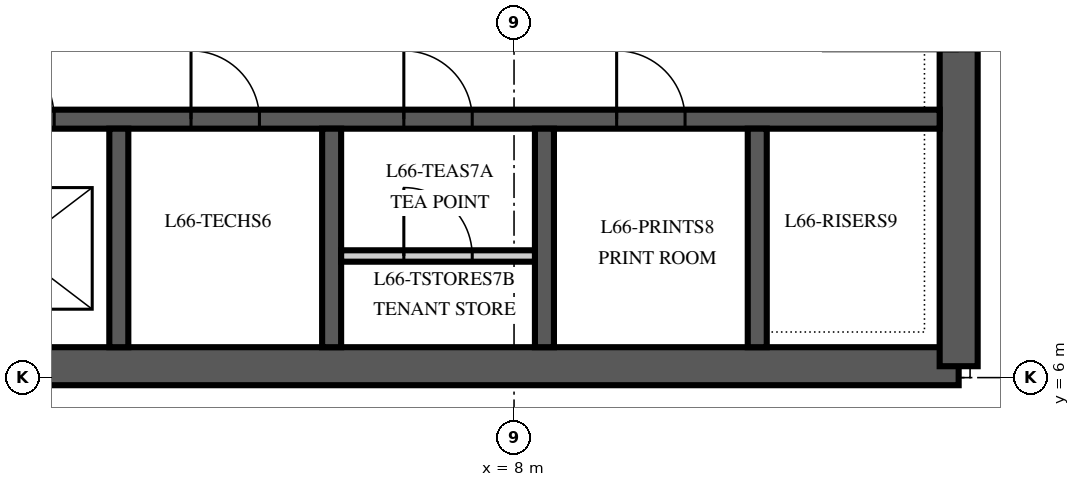
"""IFC4 building model, lengths in metres.
Left out: names, types, materials, properties, quantities, classifications, styles, units other than length and angle.
Written with IfcOpenShell. Run it as: python <this file> out.ifc"""

import sys

from ifc_helpers import new_model, si_unit, direction, frame, frame_2d, origin, place, context, subcontext, project, spatial, polyline, rectangle, outline, extrude, element, fill, save


model = new_model("IFC4")
c1 = context("Model", 3, precision=1e-05, world=origin(), true_north=direction((0.0, 1.0)))
c2 = subcontext(c1, "Body", "Model", "MODEL_VIEW")
j1 = project(units=[si_unit("LENGTHUNIT", "METRE"), si_unit("PLANEANGLEUNIT", "RADIAN")], contexts=[c1])
p1 = place(None, origin())
s1 = spatial("IfcSite", under=j1, at=p1, CompositionType="ELEMENT")
p2 = place(p1, origin())
s2 = spatial("IfcBuilding", under=s1, at=p2, CompositionType="ELEMENT")
p3 = place(p2, frame((0.0, 0.0, 284.0)))
s3 = spatial("IfcBuildingStorey", under=s2, at=p3, CompositionType="ELEMENT", Elevation=284.0)
p4 = place(p3, frame((-13.85, 6.15, 0.0), z_axis=(0.0, 0.0, 1.0), x_axis=(1.0, 0.0, 0.0)))
e1 = element("IfcWall", 1, at=p4, inside=s3, PredefinedType="SHEAR", context=c2, shape_type="SweptSolid", body=[
    extrude(rectangle(XDim=27.7, YDim=0.5, at=frame_2d((13.85, 0.0))), origin(), (0.0, 0.0, 1.0), 4.0),
])
p5 = place(p3, frame((13.85, 6.15, 0.0), z_axis=(0.0, 0.0, 1.0), x_axis=(0.0, 1.0, 0.0)))
e2 = element("IfcWall", 2, at=p5, inside=s3, PredefinedType="SHEAR", context=c2, shape_type="SweptSolid", body=[
    extrude(outline(polyline([(0.0, -0.25), (17.7, -0.25), (17.7, 0.0), (17.45, 0.0), (17.45, 0.25), (0.25, 0.25), (0.25, 0.0), (0.0, 0.0), (0.0, -0.25)])), origin(), (0.0, 0.0, 1.0), 4.0),
])
p6 = place(p5, frame((4.15, 0.0, 0.0)))
e3 = element("IfcOpeningElement", 3, at=p6, cuts=e2, PredefinedType="OPENING", context=c2, shape_type="SweptSolid", body=[
    extrude(rectangle(XDim=1.8, YDim=2.4, at=frame_2d((0.9, 1.2))), frame((0.0, 0.265, 0.0), z_axis=(0.0, -1.0, 0.0), x_axis=(1.0, 0.0, 0.0)), (0.0, 0.0, 1.0), 0.53),
])
p7 = place(p3, frame((-13.6, 9.4, 0.0), z_axis=(0.0, 0.0, 1.0), x_axis=(1.0, 0.0, 0.0)))
e4 = element("IfcWall", 4, at=p7, inside=s3, PredefinedType="SHEAR", context=c2, shape_type="SweptSolid", body=[
    extrude(rectangle(XDim=27.2, YDim=0.25, at=frame_2d((13.6, 0.0))), origin(), (0.0, 0.0, 1.0), 4.0),
])
p8 = place(p7, frame((8.85, 0.0, 0.0)))
e5 = element("IfcOpeningElement", 5, at=p8, cuts=e4, PredefinedType="OPENING", context=c2, shape_type="SweptSolid", body=[
    extrude(rectangle(XDim=1.1, YDim=2.1, at=frame_2d((0.55, 1.05))), frame((0.0, 0.14, 0.0), z_axis=(0.0, -1.0, 0.0), x_axis=(1.0, 0.0, 0.0)), (0.0, 0.0, 1.0), 0.28),
])
p9 = place(p7, frame((11.65, 0.0, 0.0)))
e6 = element("IfcOpeningElement", 6, at=p9, cuts=e4, PredefinedType="OPENING", context=c2, shape_type="SweptSolid", body=[
    extrude(rectangle(XDim=1.1, YDim=2.1, at=frame_2d((0.55, 1.05))), frame((0.0, 0.14, 0.0), z_axis=(0.0, -1.0, 0.0), x_axis=(1.0, 0.0, 0.0)), (0.0, 0.0, 1.0), 0.28),
])
p10 = place(p7, frame((14.45, 0.0, 0.0)))
e7 = element("IfcOpeningElement", 7, at=p10, cuts=e4, PredefinedType="OPENING", context=c2, shape_type="SweptSolid", body=[
    extrude(rectangle(XDim=1.1, YDim=2.1, at=frame_2d((0.55, 1.05))), frame((0.0, 0.14, 0.0), z_axis=(0.0, -1.0, 0.0), x_axis=(1.0, 0.0, 0.0)), (0.0, 0.0, 1.0), 0.28),
])
p11 = place(p7, frame((0.55, 0.0, 0.0)))
e8 = element("IfcOpeningElement", 8, at=p11, cuts=e4, PredefinedType="OPENING", context=c2, shape_type="SweptSolid", body=[
    extrude(rectangle(XDim=0.9, YDim=2.1, at=frame_2d((0.45, 1.05))), frame((0.0, 0.14, 0.0), z_axis=(0.0, -1.0, 0.0), x_axis=(1.0, 0.0, 0.0)), (0.0, 0.0, 1.0), 0.28),
])
p12 = place(p7, frame((3.35, 0.0, 0.0)))
e9 = element("IfcOpeningElement", 9, at=p12, cuts=e4, PredefinedType="OPENING", context=c2, shape_type="SweptSolid", body=[
    extrude(rectangle(XDim=0.9, YDim=2.1, at=frame_2d((0.45, 1.05))), frame((0.0, 0.14, 0.0), z_axis=(0.0, -1.0, 0.0), x_axis=(1.0, 0.0, 0.0)), (0.0, 0.0, 1.0), 0.28),
])
p13 = place(p7, frame((6.15, 0.0, 0.0)))
e10 = element("IfcOpeningElement", 10, at=p13, cuts=e4, PredefinedType="OPENING", context=c2, shape_type="SweptSolid", body=[
    extrude(rectangle(XDim=0.9, YDim=2.1, at=frame_2d((0.45, 1.05))), frame((0.0, 0.14, 0.0), z_axis=(0.0, -1.0, 0.0), x_axis=(1.0, 0.0, 0.0)), (0.0, 0.0, 1.0), 0.28),
])
p14 = place(p7, frame((17.35, 0.0, 0.0)))
e11 = element("IfcOpeningElement", 11, at=p14, cuts=e4, PredefinedType="OPENING", context=c2, shape_type="SweptSolid", body=[
    extrude(rectangle(XDim=0.9, YDim=2.1, at=frame_2d((0.45, 1.05))), frame((0.0, 0.14, 0.0), z_axis=(0.0, -1.0, 0.0), x_axis=(1.0, 0.0, 0.0)), (0.0, 0.0, 1.0), 0.28),
])
p15 = place(p7, frame((20.15, 0.0, 0.0)))
e12 = element("IfcOpeningElement", 12, at=p15, cuts=e4, PredefinedType="OPENING", context=c2, shape_type="SweptSolid", body=[
    extrude(rectangle(XDim=0.9, YDim=2.1, at=frame_2d((0.45, 1.05))), frame((0.0, 0.14, 0.0), z_axis=(0.0, -1.0, 0.0), x_axis=(1.0, 0.0, 0.0)), (0.0, 0.0, 1.0), 0.28),
])
p16 = place(p7, frame((22.95, 0.0, 0.0)))
e13 = element("IfcOpeningElement", 13, at=p16, cuts=e4, PredefinedType="OPENING", context=c2, shape_type="SweptSolid", body=[
    extrude(rectangle(XDim=0.9, YDim=2.1, at=frame_2d((0.45, 1.05))), frame((0.0, 0.14, 0.0), z_axis=(0.0, -1.0, 0.0), x_axis=(1.0, 0.0, 0.0)), (0.0, 0.0, 1.0), 0.28),
])
for number, where, z_axis, x_axis in (
    (14, (2.8, 6.4, 0.0), (0.0, 0.0, 1.0), (0.0, 1.0, 0.0)),
    (15, (5.6, 6.4, 0.0), (0.0, 0.0, 1.0), (0.0, 1.0, 0.0)),
    (16, (8.4, 6.4, 0.0), (0.0, 0.0, 1.0), (0.0, 1.0, 0.0)),
    (17, (11.2, 6.4, 0.0), (0.0, 0.0, 1.0), (0.0, 1.0, 0.0)),
):
    element("IfcWall", number, at=place(p3, frame(where, z_axis=z_axis, x_axis=x_axis)), inside=s3, PredefinedType="SHEAR", context=c2, shape_type="SweptSolid", body=[
        extrude(rectangle(XDim=2.875, YDim=0.25, at=frame_2d((1.438, 0.0))), origin(), (0.0, 0.0, 1.0), 4.0),
    ])
p17 = place(p3, frame((5.725, 7.6, 0.0), z_axis=(0.0, 0.0, 1.0), x_axis=(1.0, 0.0, 0.0)))
e18 = element("IfcWall", 18, at=p17, inside=s3, PredefinedType="PARTITIONING", context=c2, shape_type="SweptSolid", body=[
    extrude(rectangle(XDim=2.55, YDim=0.15, at=frame_2d((1.275, 0.0))), origin(), (0.0, 0.0, 1.0), 3.85),
])
p18 = place(p17, frame((0.825, 0.0, 0.0)))
e19 = element("IfcOpeningElement", 19, at=p18, cuts=e18, PredefinedType="OPENING", context=c2, shape_type="SweptSolid", body=[
    extrude(rectangle(XDim=0.9, YDim=2.1, at=frame_2d((0.45, 1.05))), frame((0.0, 0.09, 0.0), z_axis=(0.0, -1.0, 0.0), x_axis=(1.0, 0.0, 0.0)), (0.0, 0.0, 1.0), 0.18),
])
p19 = place(p10, origin())
e20 = element("IfcDoor", 20, at=p19, inside=s3, OperationType="SLIDING_TO_LEFT", PredefinedType="DOOR", context=c2, shape_type="SweptSolid", body=[
    extrude(rectangle(XDim=1.1, YDim=2.1, at=frame_2d((0.55, 1.05))), frame((0.0, 0.125, 0.0), z_axis=(0.0, -1.0, 0.0), x_axis=(1.0, 0.0, 0.0)), (0.0, 0.0, 1.0), 0.25),
])
fill(e7, e20)
p20 = place(p14, origin())
e21 = element("IfcDoor", 21, at=p20, inside=s3, OperationType="SINGLE_SWING_LEFT", PredefinedType="DOOR", context=c2, shape_type="SweptSolid", body=[
    extrude(rectangle(XDim=0.9, YDim=2.1, at=frame_2d((0.45, 1.05))), frame((0.0, 0.125, 0.0), z_axis=(0.0, -1.0, 0.0), x_axis=(1.0, 0.0, 0.0)), (0.0, 0.0, 1.0), 0.25),
])
fill(e11, e21)
p21 = place(p15, origin())
e22 = element("IfcDoor", 22, at=p21, inside=s3, OperationType="SINGLE_SWING_LEFT", PredefinedType="DOOR", context=c2, shape_type="SweptSolid", body=[
    extrude(rectangle(XDim=0.9, YDim=2.1, at=frame_2d((0.45, 1.05))), frame((0.0, 0.125, 0.0), z_axis=(0.0, -1.0, 0.0), x_axis=(1.0, 0.0, 0.0)), (0.0, 0.0, 1.0), 0.25),
])
fill(e12, e22)
p22 = place(p18, origin())
e23 = element("IfcDoor", 23, at=p22, inside=s3, OperationType="SINGLE_SWING_LEFT", PredefinedType="DOOR", context=c2, shape_type="SweptSolid", body=[
    extrude(rectangle(XDim=0.9, YDim=2.1, at=frame_2d((0.45, 1.05))), frame((0.0, 0.075, 0.0), z_axis=(0.0, -1.0, 0.0), x_axis=(1.0, 0.0, 0.0)), (0.0, 0.0, 1.0), 0.149),
])
fill(e19, e23)
p23 = place(p16, origin())
e24 = element("IfcDoor", 24, at=p23, inside=s3, OperationType="SINGLE_SWING_LEFT", PredefinedType="DOOR", context=c2, shape_type="SweptSolid", body=[
    extrude(rectangle(XDim=0.9, YDim=2.1, at=frame_2d((0.45, 1.05))), frame((0.0, 0.125, 0.0), z_axis=(0.0, -1.0, 0.0), x_axis=(1.0, 0.0, 0.0)), (0.0, 0.0, 1.0), 0.25),
])
fill(e13, e24)
save(model, sys.argv[1])
